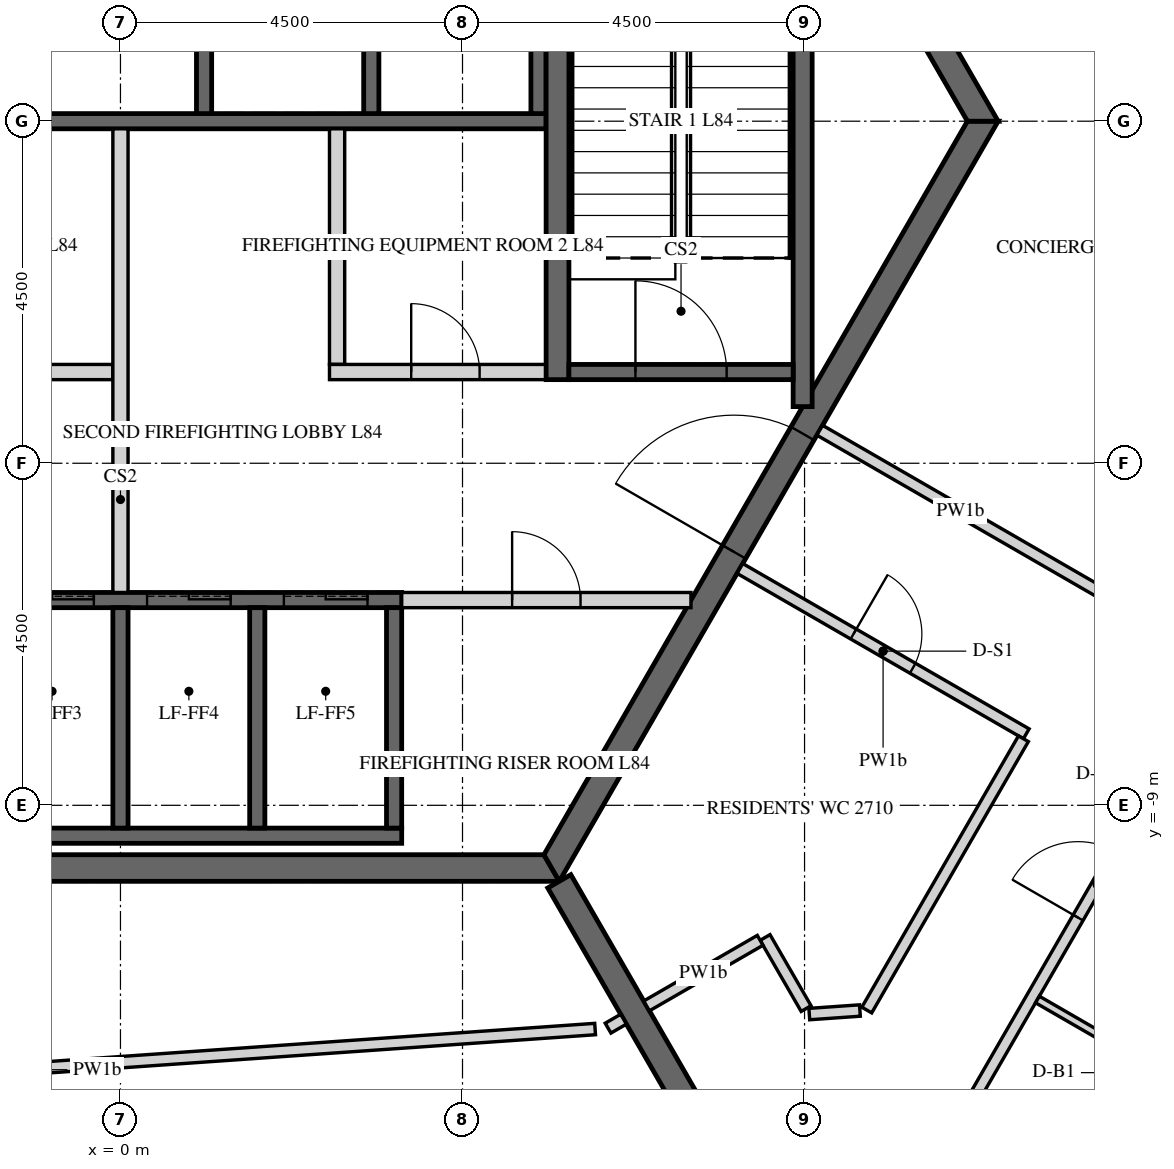
"""IFC4 building model, lengths in metres.
Left out: names, types, materials, properties, quantities, classifications, styles, units other than length and angle.
Written with IfcOpenShell. Run it as: python <this file> out.ifc"""

import sys

from ifc_helpers import new_model, si_unit, direction, frame, frame_2d, origin, place, context, subcontext, project, spatial, polyline, rectangle, outline, extrude, element, fill, save


model = new_model("IFC4")
c1 = context("Model", 3, precision=1e-05, world=origin(), true_north=direction((0.0, 1.0)))
c2 = subcontext(c1, "Body", "Model", "MODEL_VIEW")
j1 = project(units=[si_unit("LENGTHUNIT", "METRE"), si_unit("PLANEANGLEUNIT", "RADIAN")], contexts=[c1])
p1 = place(None, origin())
s1 = spatial("IfcSite", under=j1, at=p1, CompositionType="ELEMENT")
p2 = place(p1, origin())
s2 = spatial("IfcBuilding", under=s1, at=p2, CompositionType="ELEMENT")
p3 = place(p2, frame((0.0, 0.0, 349.5)))
s3 = spatial("IfcBuildingStorey", under=s2, at=p3, CompositionType="ELEMENT", Elevation=349.5)
p4 = place(p3, frame((-5.673, -9.825, 0.0), z_axis=(0.0, 0.0, 1.0), x_axis=(1.0, 0.0, 0.0)))
e1 = element("IfcWall", 1, at=p4, inside=s3, PredefinedType="SHEAR", context=c2, shape_type="SweptSolid", body=[
    extrude(outline(polyline([(-0.101, -0.175), (11.446, -0.175), (11.244, 0.175), (0.101, 0.175), (-0.101, -0.175)])), origin(), (0.0, 0.0, 1.0), 3.75),
])
p5 = place(p3, frame((5.673, -9.825, 0.0), z_axis=(0.0, 0.0, 1.0), x_axis=(0.499995046907, 0.866028263435, 0.0)))
e2 = element("IfcWall", 2, at=p5, inside=s3, PredefinedType="SHEAR", context=c2, shape_type="SweptSolid", body=[
    extrude(outline(polyline([(-0.101, -0.175), (11.446, -0.175), (11.244, 0.175), (0.101, 0.175), (-0.101, -0.175)])), origin(), (0.0, 0.0, 1.0), 3.75),
])
p6 = place(p5, frame((4.801, 0.0, 0.0)))
e3 = element("IfcOpeningElement", 3, at=p6, cuts=e2, PredefinedType="OPENING", context=c2, shape_type="SweptSolid", body=[
    extrude(rectangle(XDim=1.8, YDim=2.4, at=frame_2d((0.9, 1.2))), frame((0.0, 0.185, 0.0), z_axis=(0.0, -1.0, 0.0), x_axis=(1.0, 0.0, 0.0)), (0.0, 0.0, 1.0), 0.37),
])
p7 = place(p3, frame((11.345, 0.0, 0.0), z_axis=(0.0, 0.0, 1.0), x_axis=(-0.499995046907, 0.866028263435, 0.0)))
e4 = element("IfcWall", 4, at=p7, inside=s3, PredefinedType="SHEAR", context=c2, shape_type="SweptSolid", body=[
    extrude(outline(polyline([(-0.101, -0.175), (11.446, -0.175), (11.244, 0.175), (0.101, 0.175), (-0.101, -0.175)])), origin(), (0.0, 0.0, 1.0), 3.75),
])
p8 = place(p7, frame((4.744, 0.0, 0.0)))
e5 = element("IfcOpeningElement", 5, at=p8, cuts=e4, PredefinedType="OPENING", context=c2, shape_type="SweptSolid", body=[
    extrude(rectangle(XDim=1.8, YDim=2.4, at=frame_2d((0.9, 1.2))), frame((0.0, 0.185, 0.0), z_axis=(0.0, -1.0, 0.0), x_axis=(1.0, 0.0, 0.0)), (0.0, 0.0, 1.0), 0.37),
])
p9 = place(p3, frame((5.773, -10.0, 0.0), z_axis=(0.0, 0.0, 1.0), x_axis=(0.500007911273, -0.866020836161, 0.0)))
e6 = element("IfcWall", 6, at=p9, inside=s3, PredefinedType="SHEAR", context=c2, shape_type="SweptSolid", body=[
    extrude(rectangle(XDim=14.51, YDim=0.35, at=frame_2d((7.255, 0.0))), origin(), (0.0, 0.0, 1.0), 3.75),
])
p10 = place(p9, frame((6.355, 0.0, 0.0)))
e7 = element("IfcOpeningElement", 7, at=p10, cuts=e6, PredefinedType="OPENING", context=c2, shape_type="SweptSolid", body=[
    extrude(rectangle(XDim=1.8, YDim=2.4, at=frame_2d((0.9, 1.2))), frame((0.0, 0.185, 0.0), z_axis=(0.0, -1.0, 0.0), x_axis=(1.0, 0.0, 0.0)), (0.0, 0.0, 1.0), 0.37),
])
p11 = place(p3, frame((-5.6, 0.0, -0.5), z_axis=(0.0, 0.0, 1.0), x_axis=(1.0, 0.0, 0.0)))
e8 = element("IfcWall", 8, at=p11, inside=s3, PredefinedType="SHEAR", context=c2, shape_type="SweptSolid", body=[
    extrude(rectangle(XDim=11.2, YDim=0.2, at=frame_2d((5.6, 0.0))), origin(), (0.0, 0.0, 1.0), 4.15),
])
for number, where, z_axis, x_axis in (
    (9, (1.1, 0.1, -0.5), (0.0, 0.0, 1.0), (0.0, 1.0, 0.0)),
    (10, (3.3, 0.1, -0.5), (0.0, 0.0, 1.0), (0.0, 1.0, 0.0)),
):
    element("IfcWall", number, at=place(p3, frame(where, z_axis=z_axis, x_axis=x_axis)), inside=s3, PredefinedType="SHEAR", context=c2, shape_type="SweptSolid", body=[
        extrude(rectangle(XDim=3.3, YDim=0.2, at=frame_2d((1.65, 0.0))), origin(), (0.0, 0.0, 1.0), 4.15),
    ])
p12 = place(p3, frame((5.5, 0.1, -0.5), z_axis=(0.0, 0.0, 1.0), x_axis=(0.0, 1.0, 0.0)))
e11 = element("IfcWall", 11, at=p12, inside=s3, PredefinedType="SHEAR", context=c2, shape_type="SweptSolid", body=[
    extrude(rectangle(XDim=3.1, YDim=0.2, at=frame_2d((1.55, 0.0))), origin(), (0.0, 0.0, 1.0), 4.15),
])
p13 = place(p3, frame((-5.5, -6.3, -0.5), z_axis=(0.0, 0.0, 1.0), x_axis=(1.0, 0.0, 0.0)))
e12 = element("IfcWall", 12, at=p13, inside=s3, PredefinedType="SHEAR", context=c2, shape_type="SweptSolid", body=[
    extrude(rectangle(XDim=9.2, YDim=0.2, at=frame_2d((4.6, 0.0))), origin(), (0.0, 0.0, 1.0), 4.15),
])
p14 = place(p13, frame((0.45, 0.0, 0.5)))
e13 = element("IfcOpeningElement", 13, at=p14, cuts=e12, PredefinedType="OPENING", context=c2, shape_type="SweptSolid", body=[
    extrude(rectangle(XDim=1.1, YDim=2.1, at=frame_2d((0.55, 1.05))), frame((0.0, 0.11, 0.0), z_axis=(0.0, -1.0, 0.0), x_axis=(1.0, 0.0, 0.0)), (0.0, 0.0, 1.0), 0.22),
])
p15 = place(p13, frame((2.25, 0.0, 0.5)))
e14 = element("IfcOpeningElement", 14, at=p15, cuts=e12, PredefinedType="OPENING", context=c2, shape_type="SweptSolid", body=[
    extrude(rectangle(XDim=1.1, YDim=2.1, at=frame_2d((0.55, 1.05))), frame((0.0, 0.11, 0.0), z_axis=(0.0, -1.0, 0.0), x_axis=(1.0, 0.0, 0.0)), (0.0, 0.0, 1.0), 0.22),
])
p16 = place(p13, frame((4.05, 0.0, 0.5)))
e15 = element("IfcOpeningElement", 15, at=p16, cuts=e12, PredefinedType="OPENING", context=c2, shape_type="SweptSolid", body=[
    extrude(rectangle(XDim=1.1, YDim=2.1, at=frame_2d((0.55, 1.05))), frame((0.0, 0.11, 0.0), z_axis=(0.0, -1.0, 0.0), x_axis=(1.0, 0.0, 0.0)), (0.0, 0.0, 1.0), 0.22),
])
p17 = place(p13, frame((5.85, 0.0, 0.5)))
e16 = element("IfcOpeningElement", 16, at=p17, cuts=e12, PredefinedType="OPENING", context=c2, shape_type="SweptSolid", body=[
    extrude(rectangle(XDim=1.1, YDim=2.1, at=frame_2d((0.55, 1.05))), frame((0.0, 0.11, 0.0), z_axis=(0.0, -1.0, 0.0), x_axis=(1.0, 0.0, 0.0)), (0.0, 0.0, 1.0), 0.22),
])
p18 = place(p13, frame((7.65, 0.0, 0.5)))
e17 = element("IfcOpeningElement", 17, at=p18, cuts=e12, PredefinedType="OPENING", context=c2, shape_type="SweptSolid", body=[
    extrude(rectangle(XDim=1.1, YDim=2.1, at=frame_2d((0.55, 1.05))), frame((0.0, 0.11, 0.0), z_axis=(0.0, -1.0, 0.0), x_axis=(1.0, 0.0, 0.0)), (0.0, 0.0, 1.0), 0.22),
])
p19 = place(p3, frame((-5.5, -9.4, -0.5), z_axis=(0.0, 0.0, 1.0), x_axis=(1.0, 0.0, 0.0)))
e18 = element("IfcWall", 18, at=p19, inside=s3, PredefinedType="SHEAR", context=c2, shape_type="SweptSolid", body=[
    extrude(rectangle(XDim=9.2, YDim=0.2, at=frame_2d((4.6, 0.0))), origin(), (0.0, 0.0, 1.0), 4.15),
])
for number, where, z_axis, x_axis in (
    (19, (0.0, -9.3, -0.5), (0.0, 0.0, 1.0), (0.0, 1.0, 0.0)),
    (20, (1.8, -9.3, -0.5), (0.0, 0.0, 1.0), (0.0, 1.0, 0.0)),
    (21, (3.6, -9.3, -0.5), (0.0, 0.0, 1.0), (0.0, 1.0, 0.0)),
):
    element("IfcWall", number, at=place(p3, frame(where, z_axis=z_axis, x_axis=x_axis)), inside=s3, PredefinedType="SHEAR", context=c2, shape_type="SweptSolid", body=[
        extrude(rectangle(XDim=2.9, YDim=0.2, at=frame_2d((1.45, 0.0))), origin(), (0.0, 0.0, 1.0), 4.15),
    ])
p20 = place(p3, frame((-5.6, -3.3, 0.0), z_axis=(0.0, 0.0, 1.0), x_axis=(1.0, 0.0, 0.0)))
e22 = element("IfcWall", 22, at=p20, inside=s3, PredefinedType="PARTITIONING", context=c2, shape_type="SweptSolid", body=[
    extrude(rectangle(XDim=5.5, YDim=0.2, at=frame_2d((2.75, 0.0))), origin(), (0.0, 0.0, 1.0), 3.65),
])
p21 = place(p20, frame((2.3, 0.0, 0.0)))
e23 = element("IfcOpeningElement", 23, at=p21, cuts=e22, PredefinedType="OPENING", context=c2, shape_type="SweptSolid", body=[
    extrude(rectangle(XDim=0.9, YDim=2.1, at=frame_2d((0.45, 1.05))), frame((0.0, 0.11, 0.0), z_axis=(0.0, -1.0, 0.0), x_axis=(1.0, 0.0, 0.0)), (0.0, 0.0, 1.0), 0.22),
])
p22 = place(p3, frame((2.75, -3.3, 0.0), z_axis=(0.0, 0.0, 1.0), x_axis=(1.0, 0.0, 0.0)))
e24 = element("IfcWall", 24, at=p22, inside=s3, PredefinedType="PARTITIONING", context=c2, shape_type="SweptSolid", body=[
    extrude(rectangle(XDim=2.85, YDim=0.2, at=frame_2d((1.425, 0.0))), origin(), (0.0, 0.0, 1.0), 3.65),
])
p23 = place(p22, frame((1.075, 0.0, 0.0)))
e25 = element("IfcOpeningElement", 25, at=p23, cuts=e24, PredefinedType="OPENING", context=c2, shape_type="SweptSolid", body=[
    extrude(rectangle(XDim=0.9, YDim=2.1, at=frame_2d((0.45, 1.05))), frame((0.0, 0.11, 0.0), z_axis=(0.0, -1.0, 0.0), x_axis=(1.0, 0.0, 0.0)), (0.0, 0.0, 1.0), 0.22),
])
p24 = place(p3, frame((2.85, -3.2, 0.0), z_axis=(0.0, 0.0, 1.0), x_axis=(0.0, 1.0, 0.0)))
e26 = element("IfcWall", 26, at=p24, inside=s3, PredefinedType="PARTITIONING", context=c2, shape_type="SweptSolid", body=[
    extrude(rectangle(XDim=3.1, YDim=0.2, at=frame_2d((1.55, 0.0))), origin(), (0.0, 0.0, 1.0), 3.65),
])
p25 = place(p3, frame((0.0, -6.2, 0.0), z_axis=(0.0, 0.0, 1.0), x_axis=(0.0, 1.0, 0.0)))
e27 = element("IfcWall", 27, at=p25, inside=s3, PredefinedType="PARTITIONING", context=c2, shape_type="SweptSolid", body=[
    extrude(rectangle(XDim=6.1, YDim=0.2, at=frame_2d((3.05, 0.0))), origin(), (0.0, 0.0, 1.0), 3.65),
])
p26 = place(p3, frame((3.7, -6.3, 0.0), z_axis=(0.0, 0.0, 1.0), x_axis=(1.0, 0.0, 0.0)))
e28 = element("IfcWall", 28, at=p26, inside=s3, PredefinedType="PARTITIONING", context=c2, shape_type="SweptSolid", body=[
    extrude(rectangle(XDim=3.806, YDim=0.2, at=frame_2d((1.903, 0.0))), origin(), (0.0, 0.0, 1.0), 3.65),
])
p27 = place(p26, frame((1.453, 0.0, 0.0)))
e29 = element("IfcOpeningElement", 29, at=p27, cuts=e28, PredefinedType="OPENING", context=c2, shape_type="SweptSolid", body=[
    extrude(rectangle(XDim=0.9, YDim=2.1, at=frame_2d((0.45, 1.05))), frame((0.0, 0.11, 0.0), z_axis=(0.0, -1.0, 0.0), x_axis=(1.0, 0.0, 0.0)), (0.0, 0.0, 1.0), 0.22),
])
p28 = place(p3, frame((5.75, -3.4, -0.5), z_axis=(0.0, 0.0, 1.0), x_axis=(0.0, 1.0, 0.0)))
e30 = element("IfcWall", 30, at=p28, inside=s3, PredefinedType="SHEAR", context=c2, shape_type="SweptSolid", body=[
    extrude(rectangle(XDim=6.8, YDim=0.3, at=frame_2d((3.4, 0.0))), origin(), (0.0, 0.0, 1.0), 4.15),
])
p29 = place(p3, frame((8.975, -3.755, -0.5), z_axis=(0.0, 0.0, 1.0), x_axis=(0.0, 1.0, 0.0)))
e31 = element("IfcWall", 31, at=p29, inside=s3, PredefinedType="SHEAR", context=c2, shape_type="SweptSolid", body=[
    extrude(rectangle(XDim=7.51, YDim=0.25, at=frame_2d((3.755, 0.0))), origin(), (0.0, 0.0, 1.0), 4.15),
])
p30 = place(p3, frame((5.9, -3.3, -0.5), z_axis=(0.0, 0.0, 1.0), x_axis=(1.0, 0.0, 0.0)))
e32 = element("IfcWall", 32, at=p30, inside=s3, PredefinedType="SHEAR", context=c2, shape_type="SweptSolid", body=[
    extrude(rectangle(XDim=2.95, YDim=0.2, at=frame_2d((1.475, 0.0))), origin(), (0.0, 0.0, 1.0), 4.15),
])
p31 = place(p30, frame((0.875, 0.0, 0.5)))
e33 = element("IfcOpeningElement", 33, at=p31, cuts=e32, PredefinedType="OPENING", context=c2, shape_type="SweptSolid", body=[
    extrude(rectangle(XDim=1.2, YDim=2.4, at=frame_2d((0.6, 1.2))), frame((0.0, 0.11, 0.0), z_axis=(0.0, -1.0, 0.0), x_axis=(1.0, 0.0, 0.0)), (0.0, 0.0, 1.0), 0.22),
])
p32 = place(p3, frame((6.619, -11.814, 0.0), z_axis=(0.0, 0.0, 1.0), x_axis=(-0.865544827262, -0.500831460673, 0.0)))
e34 = element("IfcWall", 34, at=p32, inside=s3, PredefinedType="PARTITIONING", context=c2, shape_type="SweptSolid", body=[
    extrude(rectangle(XDim=0.235, YDim=0.15, at=frame_2d((0.117, 0.0))), origin(), (0.0, 0.0, 1.0), 2.82),
])
p33 = place(p3, frame((6.245, -11.944, 0.0), z_axis=(0.0, 0.0, 1.0), x_axis=(-0.997564707029, -0.069747080866, 0.0)))
e35 = element("IfcWall", 35, at=p33, inside=s3, PredefinedType="PARTITIONING", context=c2, shape_type="SweptSolid", body=[
    extrude(rectangle(XDim=15.339, YDim=0.15, at=frame_2d((7.669, 0.0))), origin(), (0.0, 0.0, 1.0), 2.82),
])
p34 = place(p33, frame((7.219, 0.0, 0.0)))
e36 = element("IfcOpeningElement", 36, at=p34, cuts=e35, PredefinedType="OPENING", context=c2, shape_type="SweptSolid", body=[
    extrude(rectangle(XDim=0.9, YDim=2.1, at=frame_2d((0.45, 1.05))), frame((0.0, 0.085, 0.0), z_axis=(0.0, -1.0, 0.0), x_axis=(1.0, 0.0, 0.0)), (0.0, 0.0, 1.0), 0.17),
])
p35 = place(p3, frame((10.937, -13.357, 0.0), z_axis=(0.0, 0.0, 1.0), x_axis=(0.499993317597, 0.866029261837, 0.0)))
e37 = element("IfcWall", 37, at=p35, inside=s3, PredefinedType="PARTITIONING", context=c2, shape_type="SweptSolid", body=[
    extrude(rectangle(XDim=13.966, YDim=0.15, at=frame_2d((6.983, 0.0))), origin(), (0.0, 0.0, 1.0), 2.82),
])
p36 = place(p35, frame((3.325, 0.0, 0.0)))
e38 = element("IfcOpeningElement", 38, at=p36, cuts=e37, PredefinedType="OPENING", context=c2, shape_type="SweptSolid", body=[
    extrude(rectangle(XDim=1.0, YDim=2.1, at=frame_2d((0.5, 1.05))), frame((0.0, 0.085, 0.0), z_axis=(0.0, -1.0, 0.0), x_axis=(1.0, 0.0, 0.0)), (0.0, 0.0, 1.0), 0.17),
])
p37 = place(p3, frame((17.873, -1.193, 0.0), z_axis=(0.0, 0.0, 1.0), x_axis=(-0.559195650252, 0.829035719821, 0.0)))
e39 = element("IfcWall", 39, at=p37, inside=s3, PredefinedType="PARTITIONING", context=c2, shape_type="SweptSolid", body=[
    extrude(rectangle(XDim=15.688, YDim=0.15, at=frame_2d((7.844, 0.0))), origin(), (0.0, 0.0, 1.0), 2.82),
])
p38 = place(p37, frame((5.792, 0.0, 0.0)))
e40 = element("IfcOpeningElement", 40, at=p38, cuts=e39, PredefinedType="OPENING", context=c2, shape_type="SweptSolid", body=[
    extrude(rectangle(XDim=1.0, YDim=2.1, at=frame_2d((0.5, 1.05))), frame((0.0, 0.085, 0.0), z_axis=(0.0, -1.0, 0.0), x_axis=(1.0, 0.0, 0.0)), (0.0, 0.0, 1.0), 0.17),
])
p39 = place(p3, frame((11.368, 5.231, 0.0), z_axis=(0.0, 0.0, 1.0), x_axis=(0.55919388604, -0.829036909803, 0.0)))
e41 = element("IfcWall", 41, at=p39, inside=s3, PredefinedType="PARTITIONING", context=c2, shape_type="SweptSolid", body=[
    extrude(rectangle(XDim=7.922, YDim=0.15, at=frame_2d((3.961, 0.0))), origin(), (0.0, 0.0, 1.0), 2.82),
])
p40 = place(p39, frame((3.511, 0.0, 0.0)))
e42 = element("IfcOpeningElement", 42, at=p40, cuts=e41, PredefinedType="OPENING", context=c2, shape_type="SweptSolid", body=[
    extrude(rectangle(XDim=0.9, YDim=2.1, at=frame_2d((0.45, 1.05))), frame((0.0, 0.085, 0.0), z_axis=(0.0, -1.0, 0.0), x_axis=(1.0, 0.0, 0.0)), (0.0, 0.0, 1.0), 0.17),
])
p41 = place(p3, frame((12.902, -6.203, 0.0), z_axis=(0.0, 0.0, 1.0), x_axis=(-0.866023907196, 0.500002592159, 0.0)))
e43 = element("IfcWall", 43, at=p41, inside=s3, PredefinedType="PARTITIONING", context=c2, shape_type="SweptSolid", body=[
    extrude(rectangle(XDim=4.275, YDim=0.15, at=frame_2d((2.137, 0.0))), origin(), (0.0, 0.0, 1.0), 2.82),
])
p42 = place(p3, frame((8.15, -5.884, 0.0), z_axis=(0.0, 0.0, 1.0), x_axis=(0.866027639635, -0.499996127374, 0.0)))
e44 = element("IfcWall", 44, at=p42, inside=s3, PredefinedType="PARTITIONING", context=c2, shape_type="SweptSolid", body=[
    extrude(rectangle(XDim=4.35, YDim=0.15, at=frame_2d((2.175, 0.0))), origin(), (0.0, 0.0, 1.0), 2.82),
])
p43 = place(p42, frame((1.725, 0.0, 0.0)))
e45 = element("IfcOpeningElement", 45, at=p43, cuts=e44, PredefinedType="OPENING", context=c2, shape_type="SweptSolid", body=[
    extrude(rectangle(XDim=0.9, YDim=2.1, at=frame_2d((0.45, 1.05))), frame((0.0, 0.085, 0.0), z_axis=(0.0, -1.0, 0.0), x_axis=(1.0, 0.0, 0.0)), (0.0, 0.0, 1.0), 0.17),
])
p44 = place(p3, frame((11.879, -8.124, 0.0), z_axis=(0.0, 0.0, 1.0), x_axis=(-0.500006178143, -0.866021836803, 0.0)))
e46 = element("IfcWall", 46, at=p44, inside=s3, PredefinedType="PARTITIONING", context=c2, shape_type="SweptSolid", body=[
    extrude(rectangle(XDim=4.122, YDim=0.15, at=frame_2d((2.061, 0.0))), origin(), (0.0, 0.0, 1.0), 2.82),
])
p45 = place(p3, frame((9.729, -11.7, 0.0), z_axis=(0.0, 0.0, 1.0), x_axis=(-0.997585124395, -0.069454442519, 0.0)))
e47 = element("IfcWall", 47, at=p45, inside=s3, PredefinedType="PARTITIONING", context=c2, shape_type="SweptSolid", body=[
    extrude(rectangle(XDim=0.668, YDim=0.15, at=frame_2d((0.334, 0.0))), origin(), (0.0, 0.0, 1.0), 2.82),
])
p46 = place(p3, frame((9.021, -11.674, 0.0), z_axis=(0.0, 0.0, 1.0), x_axis=(-0.500126914667, 0.865952117167, 0.0)))
e48 = element("IfcWall", 48, at=p46, inside=s3, PredefinedType="PARTITIONING", context=c2, shape_type="SweptSolid", body=[
    extrude(rectangle(XDim=1.08, YDim=0.15, at=frame_2d((0.54, 0.0))), origin(), (0.0, 0.0, 1.0), 2.82),
])
p47 = place(p3, frame((8.416, -10.777, 0.0), z_axis=(0.0, 0.0, 1.0), x_axis=(-0.866074815912, -0.499914405916, 0.0)))
e49 = element("IfcWall", 49, at=p47, inside=s3, PredefinedType="PARTITIONING", context=c2, shape_type="SweptSolid", body=[
    extrude(rectangle(XDim=1.725, YDim=0.15, at=frame_2d((0.862, 0.0))), origin(), (0.0, 0.0, 1.0), 2.82),
])
p48 = place(p3, frame((12.064, -11.555, 0.0), z_axis=(0.0, 0.0, 1.0), x_axis=(0.866037464623, -0.499979109433, 0.0)))
e50 = element("IfcWall", 50, at=p48, inside=s3, PredefinedType="PARTITIONING", context=c2, shape_type="SweptSolid", body=[
    extrude(rectangle(XDim=3.925, YDim=0.1, at=frame_2d((1.962, 0.0))), origin(), (0.0, 0.0, 1.0), 2.82),
])
p49 = place(p48, frame((1.525, 0.0, 0.0)))
e51 = element("IfcOpeningElement", 51, at=p49, cuts=e50, PredefinedType="OPENING", context=c2, shape_type="SweptSolid", body=[
    extrude(rectangle(XDim=0.8, YDim=2.1, at=frame_2d((0.4, 1.05))), frame((0.0, 0.06, 0.0), z_axis=(0.0, -1.0, 0.0), x_axis=(1.0, 0.0, 0.0)), (0.0, 0.0, 1.0), 0.12),
])
p50 = place(p6, origin())
e52 = element("IfcDoor", 52, at=p50, inside=s3, OperationType="DOUBLE_DOOR_SINGLE_SWING", PredefinedType="DOOR", context=c2, shape_type="SweptSolid", body=[
    extrude(rectangle(XDim=1.8, YDim=2.4, at=frame_2d((0.9, 1.2))), frame((0.0, 0.025, 0.0), z_axis=(0.0, -1.0, 0.0), x_axis=(1.0, 0.0, 0.0)), (0.0, 0.0, 1.0), 0.05),
])
fill(e3, e52)
p51 = place(p23, origin())
e53 = element("IfcDoor", 53, at=p51, inside=s3, OperationType="SINGLE_SWING_LEFT", PredefinedType="DOOR", context=c2, shape_type="SweptSolid", body=[
    extrude(rectangle(XDim=0.9, YDim=2.1, at=frame_2d((0.45, 1.05))), frame((0.0, 0.025, 0.0), z_axis=(0.0, -1.0, 0.0), x_axis=(1.0, 0.0, 0.0)), (0.0, 0.0, 1.0), 0.05),
])
fill(e25, e53)
p52 = place(p27, origin())
e54 = element("IfcDoor", 54, at=p52, inside=s3, OperationType="SINGLE_SWING_LEFT", PredefinedType="DOOR", context=c2, shape_type="SweptSolid", body=[
    extrude(rectangle(XDim=0.9, YDim=2.1, at=frame_2d((0.45, 1.05))), frame((0.0, 0.025, 0.0), z_axis=(0.0, -1.0, 0.0), x_axis=(1.0, 0.0, 0.0)), (0.0, 0.0, 1.0), 0.05),
])
fill(e29, e54)
p53 = place(p31, origin())
e55 = element("IfcDoor", 55, at=p53, inside=s3, OperationType="SINGLE_SWING_LEFT", PredefinedType="DOOR", context=c2, shape_type="SweptSolid", body=[
    extrude(rectangle(XDim=1.2, YDim=2.4, at=frame_2d((0.6, 1.2))), frame((0.0, 0.025, 0.0), z_axis=(0.0, -1.0, 0.0), x_axis=(1.0, 0.0, 0.0)), (0.0, 0.0, 1.0), 0.05),
])
fill(e33, e55)
p54 = place(p16, origin())
e56 = element("IfcDoor", 56, at=p54, inside=s3, OperationType="SLIDING_TO_LEFT", PredefinedType="DOOR", context=c2, shape_type="SweptSolid", body=[
    extrude(rectangle(XDim=1.1, YDim=2.1, at=frame_2d((0.55, 1.05))), frame((0.0, 0.025, 0.0), z_axis=(0.0, -1.0, 0.0), x_axis=(1.0, 0.0, 0.0)), (0.0, 0.0, 1.0), 0.05),
])
fill(e15, e56)
p55 = place(p17, origin())
e57 = element("IfcDoor", 57, at=p55, inside=s3, OperationType="SLIDING_TO_LEFT", PredefinedType="DOOR", context=c2, shape_type="SweptSolid", body=[
    extrude(rectangle(XDim=1.1, YDim=2.1, at=frame_2d((0.55, 1.05))), frame((0.0, 0.025, 0.0), z_axis=(0.0, -1.0, 0.0), x_axis=(1.0, 0.0, 0.0)), (0.0, 0.0, 1.0), 0.05),
])
fill(e16, e57)
p56 = place(p18, origin())
e58 = element("IfcDoor", 58, at=p56, inside=s3, OperationType="SLIDING_TO_LEFT", PredefinedType="DOOR", context=c2, shape_type="SweptSolid", body=[
    extrude(rectangle(XDim=1.1, YDim=2.1, at=frame_2d((0.55, 1.05))), frame((0.0, 0.025, 0.0), z_axis=(0.0, -1.0, 0.0), x_axis=(1.0, 0.0, 0.0)), (0.0, 0.0, 1.0), 0.05),
])
fill(e17, e58)
p57 = place(p36, origin())
e59 = element("IfcDoor", 59, at=p57, inside=s3, OperationType="SINGLE_SWING_LEFT", PredefinedType="DOOR", context=c2, shape_type="SweptSolid", body=[
    extrude(rectangle(XDim=1.0, YDim=2.1, at=frame_2d((0.5, 1.05))), frame((0.0, 0.025, 0.0), z_axis=(0.0, -1.0, 0.0), x_axis=(1.0, 0.0, 0.0)), (0.0, 0.0, 1.0), 0.05),
])
fill(e38, e59)
p58 = place(p43, origin())
e60 = element("IfcDoor", 60, at=p58, inside=s3, OperationType="SINGLE_SWING_LEFT", PredefinedType="DOOR", context=c2, shape_type="SweptSolid", body=[
    extrude(rectangle(XDim=0.9, YDim=2.1, at=frame_2d((0.45, 1.05))), frame((0.0, 0.025, 0.0), z_axis=(0.0, -1.0, 0.0), x_axis=(1.0, 0.0, 0.0)), (0.0, 0.0, 1.0), 0.05),
])
fill(e45, e60)
save(model, sys.argv[1])
